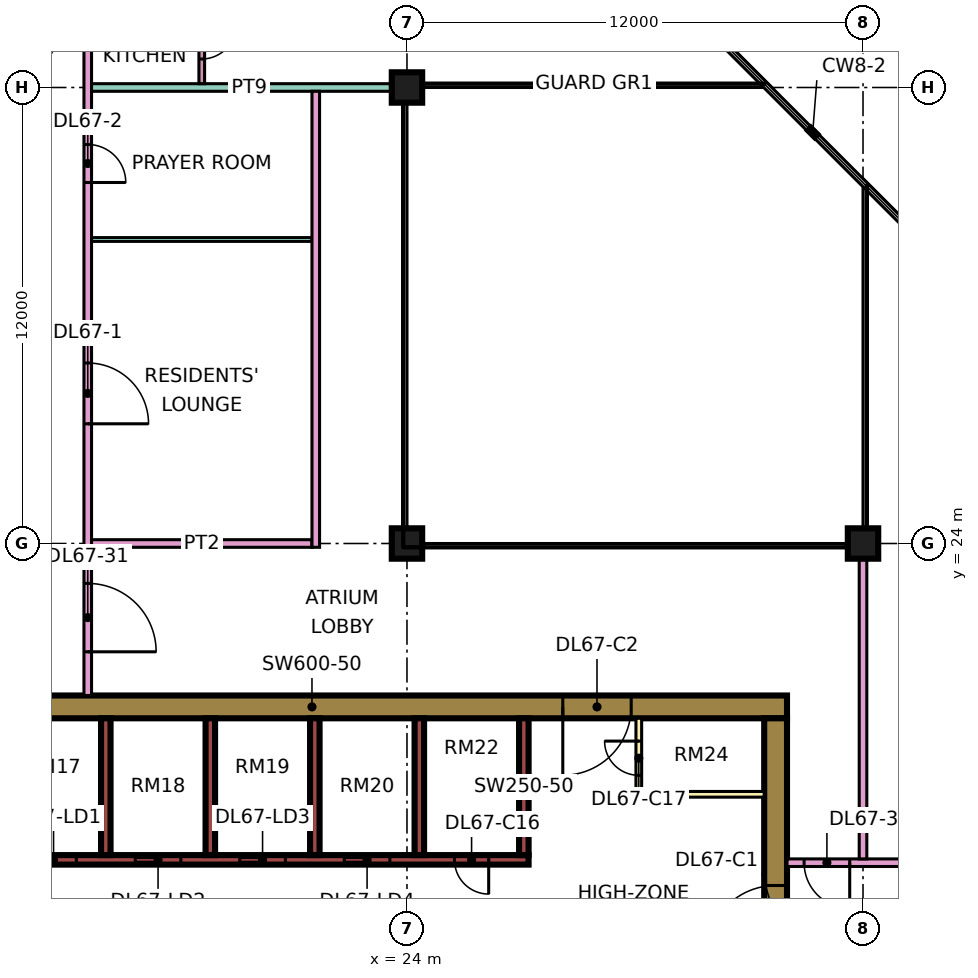
"""IFC4 building model, lengths in metres.
Left out: names, types, materials, properties, quantities, classifications, styles, units other than length and angle.
Written with IfcOpenShell. Run it as: python <this file> out.ifc"""

import sys

from ifc_helpers import new_model, si_unit, direction, frame, frame_2d, origin, origin_2d, place, context, subcontext, project, spatial, rectangle, extrude, element, fill, save


model = new_model("IFC4")
c1 = context("Model", 3, precision=1e-05, world=origin(), true_north=direction((0.0, 1.0)))
c2 = subcontext(c1, "Body", "Model", "MODEL_VIEW")
j1 = project(units=[si_unit("LENGTHUNIT", "METRE"), si_unit("PLANEANGLEUNIT", "RADIAN")], contexts=[c1])
p1 = place(None, origin())
s1 = spatial("IfcSite", under=j1, at=p1, CompositionType="ELEMENT")
p2 = place(p1, origin())
s2 = spatial("IfcBuilding", under=s1, at=p2, CompositionType="ELEMENT")
p3 = place(p2, frame((0.0, 0.0, 288.4)))
s3 = spatial("IfcBuildingStorey", under=s2, at=p3, CompositionType="ELEMENT", Elevation=288.4)
for number, where, z_axis, x_axis in (
    (1, (24.0, 24.0, 0.0), (0.0, 0.0, 1.0), (1.0, 0.0, 0.0)),
    (2, (24.0, 36.0, 0.0), (0.0, 0.0, 1.0), (1.0, 0.0, 0.0)),
    (3, (36.0, 24.0, 0.0), (0.0, 0.0, 1.0), (1.0, 0.0, 0.0)),
):
    element("IfcColumn", number, at=place(p3, frame(where, z_axis=z_axis, x_axis=x_axis)), inside=s3, PredefinedType="COLUMN", context=c2, shape_type="SweptSolid", body=[
        extrude(rectangle(XDim=0.8, YDim=0.8, at=origin_2d()), origin(), (0.0, 0.0, 1.0), 3.75),
    ])
p4 = place(p3, frame((9.0, 19.7, 0.0), z_axis=(0.0, 0.0, 1.0), x_axis=(1.0, 0.0, 0.0)))
e4 = element("IfcWall", 4, at=p4, inside=s3, PredefinedType="SHEAR", context=c2, shape_type="SweptSolid", body=[
    extrude(rectangle(XDim=25.0, YDim=0.6, at=frame_2d((12.5, 0.0))), origin(), (0.0, 0.0, 1.0), 3.75),
])
p5 = place(p4, frame((19.1, 0.0, 0.0)))
e5 = element("IfcOpeningElement", 5, at=p5, cuts=e4, PredefinedType="OPENING", context=c2, shape_type="SweptSolid", body=[
    extrude(rectangle(XDim=1.8, YDim=2.4, at=frame_2d((0.9, 1.2))), frame((0.0, 0.31, 0.0), z_axis=(0.0, -1.0, 0.0), x_axis=(1.0, 0.0, 0.0)), (0.0, 0.0, 1.0), 0.62),
])
p6 = place(p3, frame((33.7, 7.6, 0.0), z_axis=(0.0, 0.0, 1.0), x_axis=(0.0, 1.0, 0.0)))
e6 = element("IfcWall", 6, at=p6, inside=s3, PredefinedType="SHEAR", context=c2, shape_type="SweptSolid", body=[
    extrude(rectangle(XDim=11.8, YDim=0.6, at=frame_2d((5.9, 0.0))), origin(), (0.0, 0.0, 1.0), 3.75),
])
p7 = place(p6, frame((5.6, 0.0, 0.0)))
e7 = element("IfcOpeningElement", 7, at=p7, cuts=e6, PredefinedType="OPENING", context=c2, shape_type="SweptSolid", body=[
    extrude(rectangle(XDim=1.8, YDim=2.4, at=frame_2d((0.9, 1.2))), frame((0.0, 0.31, 0.0), z_axis=(0.0, -1.0, 0.0), x_axis=(1.0, 0.0, 0.0)), (0.0, 0.0, 1.0), 0.62),
])
p8 = place(p3, frame((13.45, 15.675, 0.0), z_axis=(0.0, 0.0, 1.0), x_axis=(1.0, 0.0, 0.0)))
e8 = element("IfcWall", 8, at=p8, inside=s3, PredefinedType="SHEAR", context=c2, shape_type="SweptSolid", body=[
    extrude(rectangle(XDim=13.75, YDim=0.25, at=frame_2d((6.875, 0.0))), origin(), (0.0, 0.0, 1.0), 3.75),
])
p9 = place(p8, frame((0.65, 0.0, 0.0)))
e9 = element("IfcOpeningElement", 9, at=p9, cuts=e8, PredefinedType="OPENING", context=c2, shape_type="SweptSolid", body=[
    extrude(rectangle(XDim=1.2, YDim=2.2, at=frame_2d((0.6, 1.1))), frame((0.0, 0.135, 0.0), z_axis=(0.0, -1.0, 0.0), x_axis=(1.0, 0.0, 0.0)), (0.0, 0.0, 1.0), 0.27),
])
p10 = place(p8, frame((3.4, 0.0, 0.0)))
e10 = element("IfcOpeningElement", 10, at=p10, cuts=e8, PredefinedType="OPENING", context=c2, shape_type="SweptSolid", body=[
    extrude(rectangle(XDim=1.2, YDim=2.2, at=frame_2d((0.6, 1.1))), frame((0.0, 0.135, 0.0), z_axis=(0.0, -1.0, 0.0), x_axis=(1.0, 0.0, 0.0)), (0.0, 0.0, 1.0), 0.27),
])
p11 = place(p8, frame((6.15, 0.0, 0.0)))
e11 = element("IfcOpeningElement", 11, at=p11, cuts=e8, PredefinedType="OPENING", context=c2, shape_type="SweptSolid", body=[
    extrude(rectangle(XDim=1.2, YDim=2.2, at=frame_2d((0.6, 1.1))), frame((0.0, 0.135, 0.0), z_axis=(0.0, -1.0, 0.0), x_axis=(1.0, 0.0, 0.0)), (0.0, 0.0, 1.0), 0.27),
])
p12 = place(p8, frame((8.9, 0.0, 0.0)))
e12 = element("IfcOpeningElement", 12, at=p12, cuts=e8, PredefinedType="OPENING", context=c2, shape_type="SweptSolid", body=[
    extrude(rectangle(XDim=1.2, YDim=2.2, at=frame_2d((0.6, 1.1))), frame((0.0, 0.135, 0.0), z_axis=(0.0, -1.0, 0.0), x_axis=(1.0, 0.0, 0.0)), (0.0, 0.0, 1.0), 0.27),
])
p13 = place(p8, frame((11.8, 0.0, 0.0)))
e13 = element("IfcOpeningElement", 13, at=p13, cuts=e8, PredefinedType="OPENING", context=c2, shape_type="SweptSolid", body=[
    extrude(rectangle(XDim=0.9, YDim=2.1, at=frame_2d((0.45, 1.05))), frame((0.0, 0.135, 0.0), z_axis=(0.0, -1.0, 0.0), x_axis=(1.0, 0.0, 0.0)), (0.0, 0.0, 1.0), 0.27),
])
for number, where, z_axis, x_axis in (
    (14, (16.075, 15.8, 0.0), (0.0, 0.0, 1.0), (0.0, 1.0, 0.0)),
    (15, (18.825, 15.8, 0.0), (0.0, 0.0, 1.0), (0.0, 1.0, 0.0)),
    (16, (21.575, 15.8, 0.0), (0.0, 0.0, 1.0), (0.0, 1.0, 0.0)),
    (17, (24.325, 15.8, 0.0), (0.0, 0.0, 1.0), (0.0, 1.0, 0.0)),
    (18, (27.075, 15.8, 0.0), (0.0, 0.0, 1.0), (0.0, 1.0, 0.0)),
):
    element("IfcWall", number, at=place(p3, frame(where, z_axis=z_axis, x_axis=x_axis)), inside=s3, PredefinedType="SHEAR", context=c2, shape_type="SweptSolid", body=[
        extrude(rectangle(XDim=3.6, YDim=0.25, at=frame_2d((1.8, 0.0))), origin(), (0.0, 0.0, 1.0), 3.75),
    ])
p14 = place(p3, frame((30.1, 17.4, 0.0), z_axis=(0.0, 0.0, 1.0), x_axis=(0.0, 1.0, 0.0)))
e19 = element("IfcWall", 19, at=p14, inside=s3, PredefinedType="PARTITIONING", context=c2, shape_type="SweptSolid", body=[
    extrude(rectangle(XDim=2.0, YDim=0.15, at=frame_2d((1.0, 0.0))), origin(), (0.0, 0.0, 1.0), 3.35),
])
p15 = place(p14, frame((0.5, 0.0, 0.0)))
e20 = element("IfcOpeningElement", 20, at=p15, cuts=e19, PredefinedType="OPENING", context=c2, shape_type="SweptSolid", body=[
    extrude(rectangle(XDim=0.9, YDim=2.1, at=frame_2d((0.45, 1.05))), frame((0.0, 0.085, 0.0), z_axis=(0.0, -1.0, 0.0), x_axis=(1.0, 0.0, 0.0)), (0.0, 0.0, 1.0), 0.17),
])
p16 = place(p3, frame((30.1, 17.4, 0.0), z_axis=(0.0, 0.0, 1.0), x_axis=(1.0, 0.0, 0.0)))
e21 = element("IfcWall", 21, at=p16, inside=s3, PredefinedType="PARTITIONING", context=c2, shape_type="SweptSolid", body=[
    extrude(rectangle(XDim=3.3, YDim=0.15, at=frame_2d((1.65, 0.0))), origin(), (0.0, 0.0, 1.0), 3.35),
])
p17 = place(p3, frame((15.6, 20.0, 0.0), z_axis=(0.0, 0.0, 1.0), x_axis=(0.0, 1.0, 0.0)))
e22 = element("IfcWall", 22, at=p17, inside=s3, PredefinedType="PARTITIONING", context=c2, shape_type="SweptSolid", body=[
    extrude(rectangle(XDim=27.775, YDim=0.2, at=frame_2d((13.887, 0.0))), origin(), (0.0, 0.0, 1.0), 3.35),
])
p18 = place(p17, frame((7.15, 0.0, 0.0)))
e23 = element("IfcOpeningElement", 23, at=p18, cuts=e22, PredefinedType="OPENING", context=c2, shape_type="SweptSolid", body=[
    extrude(rectangle(XDim=1.6, YDim=2.1, at=frame_2d((0.8, 1.05))), frame((0.0, 0.11, 0.0), z_axis=(0.0, -1.0, 0.0), x_axis=(1.0, 0.0, 0.0)), (0.0, 0.0, 1.0), 0.22),
])
p19 = place(p17, frame((13.5, 0.0, 0.0)))
e24 = element("IfcOpeningElement", 24, at=p19, cuts=e22, PredefinedType="OPENING", context=c2, shape_type="SweptSolid", body=[
    extrude(rectangle(XDim=1.0, YDim=2.1, at=frame_2d((0.5, 1.05))), frame((0.0, 0.11, 0.0), z_axis=(0.0, -1.0, 0.0), x_axis=(1.0, 0.0, 0.0)), (0.0, 0.0, 1.0), 0.22),
])
p20 = place(p17, frame((22.75, 0.0, 0.0)))
e25 = element("IfcOpeningElement", 25, at=p20, cuts=e22, PredefinedType="OPENING", context=c2, shape_type="SweptSolid", body=[
    extrude(rectangle(XDim=1.0, YDim=2.1, at=frame_2d((0.5, 1.05))), frame((0.0, 0.11, 0.0), z_axis=(0.0, -1.0, 0.0), x_axis=(1.0, 0.0, 0.0)), (0.0, 0.0, 1.0), 0.22),
])
p21 = place(p17, frame((1.15, 0.0, 0.0)))
e26 = element("IfcOpeningElement", 26, at=p21, cuts=e22, PredefinedType="OPENING", context=c2, shape_type="SweptSolid", body=[
    extrude(rectangle(XDim=1.8, YDim=2.1, at=frame_2d((0.9, 1.05))), frame((0.0, 0.11, 0.0), z_axis=(0.0, -1.0, 0.0), x_axis=(1.0, 0.0, 0.0)), (0.0, 0.0, 1.0), 0.22),
])
p22 = place(p17, frame((25.9, 0.0, 0.0)))
e27 = element("IfcOpeningElement", 27, at=p22, cuts=e22, PredefinedType="OPENING", context=c2, shape_type="SweptSolid", body=[
    extrude(rectangle(XDim=1.0, YDim=2.1, at=frame_2d((0.5, 1.05))), frame((0.0, 0.11, 0.0), z_axis=(0.0, -1.0, 0.0), x_axis=(1.0, 0.0, 0.0)), (0.0, 0.0, 1.0), 0.22),
])
p23 = place(p3, frame((15.7, 24.0, 0.0), z_axis=(0.0, 0.0, 1.0), x_axis=(1.0, 0.0, 0.0)))
e28 = element("IfcWall", 28, at=p23, inside=s3, PredefinedType="PARTITIONING", context=c2, shape_type="SweptSolid", body=[
    extrude(rectangle(XDim=5.8, YDim=0.2, at=frame_2d((2.9, 0.0))), origin(), (0.0, 0.0, 1.0), 3.35),
])
p24 = place(p3, frame((15.7, 32.0, 0.0), z_axis=(0.0, 0.0, 1.0), x_axis=(1.0, 0.0, 0.0)))
e29 = element("IfcWall", 29, at=p24, inside=s3, PredefinedType="PARTITIONING", context=c2, shape_type="SweptSolid", body=[
    extrude(rectangle(XDim=5.8, YDim=0.1, at=frame_2d((2.9, 0.0))), origin(), (0.0, 0.0, 1.0), 3.35),
])
p25 = place(p3, frame((15.7, 36.0, 0.0), z_axis=(0.0, 0.0, 1.0), x_axis=(1.0, 0.0, 0.0)))
e30 = element("IfcWall", 30, at=p25, inside=s3, PredefinedType="PARTITIONING", context=c2, shape_type="SweptSolid", body=[
    extrude(rectangle(XDim=8.3, YDim=0.2, at=frame_2d((4.15, 0.0))), origin(), (0.0, 0.0, 1.0), 3.35),
])
p26 = place(p3, frame((18.6, 36.1, 0.0), z_axis=(0.0, 0.0, 1.0), x_axis=(0.0, 1.0, 0.0)))
e31 = element("IfcWall", 31, at=p26, inside=s3, PredefinedType="PARTITIONING", context=c2, shape_type="SweptSolid", body=[
    extrude(rectangle(XDim=5.375, YDim=0.15, at=frame_2d((2.688, 0.0))), origin(), (0.0, 0.0, 1.0), 3.35),
])
p27 = place(p26, frame((3.45, 0.0, 0.0)))
e32 = element("IfcOpeningElement", 32, at=p27, cuts=e31, PredefinedType="OPENING", context=c2, shape_type="SweptSolid", body=[
    extrude(rectangle(XDim=0.8, YDim=2.1, at=frame_2d((0.4, 1.05))), frame((0.0, 0.085, 0.0), z_axis=(0.0, -1.0, 0.0), x_axis=(1.0, 0.0, 0.0)), (0.0, 0.0, 1.0), 0.17),
])
p28 = place(p26, frame((0.65, 0.0, 0.0)))
e33 = element("IfcOpeningElement", 33, at=p28, cuts=e31, PredefinedType="OPENING", context=c2, shape_type="SweptSolid", body=[
    extrude(rectangle(XDim=0.9, YDim=2.1, at=frame_2d((0.45, 1.05))), frame((0.0, 0.085, 0.0), z_axis=(0.0, -1.0, 0.0), x_axis=(1.0, 0.0, 0.0)), (0.0, 0.0, 1.0), 0.17),
])
p29 = place(p3, frame((21.6, 23.9, 0.0), z_axis=(0.0, 0.0, 1.0), x_axis=(0.0, 1.0, 0.0)))
e34 = element("IfcWall", 34, at=p29, inside=s3, PredefinedType="PARTITIONING", context=c2, shape_type="SweptSolid", body=[
    extrude(rectangle(XDim=12.0, YDim=0.2, at=frame_2d((6.0, 0.0))), origin(), (0.0, 0.0, 1.0), 3.35),
])
p30 = place(p3, frame((34.0, 15.6, 0.0), z_axis=(0.0, 0.0, 1.0), x_axis=(1.0, 0.0, 0.0)))
e35 = element("IfcWall", 35, at=p30, inside=s3, PredefinedType="PARTITIONING", context=c2, shape_type="SweptSolid", body=[
    extrude(rectangle(XDim=10.35, YDim=0.2, at=frame_2d((5.175, 0.0))), origin(), (0.0, 0.0, 1.0), 3.35),
])
p31 = place(p30, frame((5.6, 0.0, 0.0)))
e36 = element("IfcOpeningElement", 36, at=p31, cuts=e35, PredefinedType="OPENING", context=c2, shape_type="SweptSolid", body=[
    extrude(rectangle(XDim=1.0, YDim=2.1, at=frame_2d((0.5, 1.05))), frame((0.0, 0.11, 0.0), z_axis=(0.0, -1.0, 0.0), x_axis=(1.0, 0.0, 0.0)), (0.0, 0.0, 1.0), 0.22),
])
p32 = place(p30, frame((0.45, 0.0, 0.0)))
e37 = element("IfcOpeningElement", 37, at=p32, cuts=e35, PredefinedType="OPENING", context=c2, shape_type="SweptSolid", body=[
    extrude(rectangle(XDim=1.2, YDim=2.1, at=frame_2d((0.6, 1.05))), frame((0.0, 0.11, 0.0), z_axis=(0.0, -1.0, 0.0), x_axis=(1.0, 0.0, 0.0)), (0.0, 0.0, 1.0), 0.22),
])
p33 = place(p3, frame((36.0, 15.7, 0.0), z_axis=(0.0, 0.0, 1.0), x_axis=(0.0, 1.0, 0.0)))
e38 = element("IfcWall", 38, at=p33, inside=s3, PredefinedType="PARTITIONING", context=c2, shape_type="SweptSolid", body=[
    extrude(rectangle(XDim=8.3, YDim=0.2, at=frame_2d((4.15, 0.0))), origin(), (0.0, 0.0, 1.0), 3.35),
])
p34 = place(p9, origin())
e39 = element("IfcDoor", 39, at=p34, inside=s3, OperationType="DOUBLE_DOOR_SLIDING", PredefinedType="DOOR", context=c2, shape_type="SweptSolid", body=[
    extrude(rectangle(XDim=1.2, YDim=2.2, at=frame_2d((0.6, 1.1))), frame((0.0, 0.025, 0.0), z_axis=(0.0, -1.0, 0.0), x_axis=(1.0, 0.0, 0.0)), (0.0, 0.0, 1.0), 0.05),
])
fill(e9, e39)
p35 = place(p10, origin())
e40 = element("IfcDoor", 40, at=p35, inside=s3, OperationType="DOUBLE_DOOR_SLIDING", PredefinedType="DOOR", context=c2, shape_type="SweptSolid", body=[
    extrude(rectangle(XDim=1.2, YDim=2.2, at=frame_2d((0.6, 1.1))), frame((0.0, 0.025, 0.0), z_axis=(0.0, -1.0, 0.0), x_axis=(1.0, 0.0, 0.0)), (0.0, 0.0, 1.0), 0.05),
])
fill(e10, e40)
p36 = place(p11, origin())
e41 = element("IfcDoor", 41, at=p36, inside=s3, OperationType="DOUBLE_DOOR_SLIDING", PredefinedType="DOOR", context=c2, shape_type="SweptSolid", body=[
    extrude(rectangle(XDim=1.2, YDim=2.2, at=frame_2d((0.6, 1.1))), frame((0.0, 0.025, 0.0), z_axis=(0.0, -1.0, 0.0), x_axis=(1.0, 0.0, 0.0)), (0.0, 0.0, 1.0), 0.05),
])
fill(e11, e41)
p37 = place(p12, origin())
e42 = element("IfcDoor", 42, at=p37, inside=s3, OperationType="DOUBLE_DOOR_SLIDING", PredefinedType="DOOR", context=c2, shape_type="SweptSolid", body=[
    extrude(rectangle(XDim=1.2, YDim=2.2, at=frame_2d((0.6, 1.1))), frame((0.0, 0.025, 0.0), z_axis=(0.0, -1.0, 0.0), x_axis=(1.0, 0.0, 0.0)), (0.0, 0.0, 1.0), 0.05),
])
fill(e12, e42)
p38 = place(p7, origin())
e43 = element("IfcDoor", 43, at=p38, inside=s3, OperationType="DOUBLE_DOOR_SINGLE_SWING", PredefinedType="DOOR", context=c2, shape_type="SweptSolid", body=[
    extrude(rectangle(XDim=1.8, YDim=2.4, at=frame_2d((0.9, 1.2))), frame((0.0, 0.025, 0.0), z_axis=(0.0, -1.0, 0.0), x_axis=(1.0, 0.0, 0.0)), (0.0, 0.0, 1.0), 0.05),
])
fill(e7, e43)
p39 = place(p5, frame((1.8, 0.0, 0.0), z_axis=(0.0, 0.0, 1.0), x_axis=(-1.0, 0.0, 0.0)))
e44 = element("IfcDoor", 44, at=p39, inside=s3, OperationType="DOUBLE_DOOR_SINGLE_SWING", PredefinedType="DOOR", context=c2, shape_type="SweptSolid", body=[
    extrude(rectangle(XDim=1.8, YDim=2.4, at=frame_2d((0.9, 1.2))), frame((0.0, 0.025, 0.0), z_axis=(0.0, -1.0, 0.0), x_axis=(1.0, 0.0, 0.0)), (0.0, 0.0, 1.0), 0.05),
])
fill(e5, e44)
p40 = place(p13, origin())
e45 = element("IfcDoor", 45, at=p40, inside=s3, OperationType="SINGLE_SWING_RIGHT", PredefinedType="DOOR", context=c2, shape_type="SweptSolid", body=[
    extrude(rectangle(XDim=0.9, YDim=2.1, at=frame_2d((0.45, 1.05))), frame((0.0, 0.025, 0.0), z_axis=(0.0, -1.0, 0.0), x_axis=(1.0, 0.0, 0.0)), (0.0, 0.0, 1.0), 0.05),
])
fill(e13, e45)
p41 = place(p15, frame((0.9, 0.0, 0.0), z_axis=(0.0, 0.0, 1.0), x_axis=(-1.0, 0.0, 0.0)))
e46 = element("IfcDoor", 46, at=p41, inside=s3, OperationType="SINGLE_SWING_RIGHT", PredefinedType="DOOR", context=c2, shape_type="SweptSolid", body=[
    extrude(rectangle(XDim=0.9, YDim=2.1, at=frame_2d((0.45, 1.05))), frame((0.0, 0.025, 0.0), z_axis=(0.0, -1.0, 0.0), x_axis=(1.0, 0.0, 0.0)), (0.0, 0.0, 1.0), 0.05),
])
fill(e20, e46)
p42 = place(p18, frame((1.6, 0.0, 0.0), z_axis=(0.0, 0.0, 1.0), x_axis=(-1.0, 0.0, 0.0)))
e47 = element("IfcDoor", 47, at=p42, inside=s3, OperationType="DOUBLE_DOOR_SINGLE_SWING", PredefinedType="DOOR", context=c2, shape_type="SweptSolid", body=[
    extrude(rectangle(XDim=1.6, YDim=2.1, at=frame_2d((0.8, 1.05))), frame((0.0, 0.025, 0.0), z_axis=(0.0, -1.0, 0.0), x_axis=(1.0, 0.0, 0.0)), (0.0, 0.0, 1.0), 0.05),
])
fill(e23, e47)
p43 = place(p19, frame((1.0, 0.0, 0.0), z_axis=(0.0, 0.0, 1.0), x_axis=(-1.0, 0.0, 0.0)))
e48 = element("IfcDoor", 48, at=p43, inside=s3, OperationType="SINGLE_SWING_LEFT", PredefinedType="DOOR", context=c2, shape_type="SweptSolid", body=[
    extrude(rectangle(XDim=1.0, YDim=2.1, at=frame_2d((0.5, 1.05))), frame((0.0, 0.025, 0.0), z_axis=(0.0, -1.0, 0.0), x_axis=(1.0, 0.0, 0.0)), (0.0, 0.0, 1.0), 0.05),
])
fill(e24, e48)
p44 = place(p28, origin())
e49 = element("IfcDoor", 49, at=p44, inside=s3, OperationType="SINGLE_SWING_RIGHT", PredefinedType="DOOR", context=c2, shape_type="SweptSolid", body=[
    extrude(rectangle(XDim=0.9, YDim=2.1, at=frame_2d((0.45, 1.05))), frame((0.0, 0.025, 0.0), z_axis=(0.0, -1.0, 0.0), x_axis=(1.0, 0.0, 0.0)), (0.0, 0.0, 1.0), 0.05),
])
fill(e33, e49)
p45 = place(p32, origin())
e50 = element("IfcDoor", 50, at=p45, inside=s3, OperationType="SINGLE_SWING_RIGHT", PredefinedType="DOOR", context=c2, shape_type="SweptSolid", body=[
    extrude(rectangle(XDim=1.2, YDim=2.1, at=frame_2d((0.6, 1.05))), frame((0.0, 0.025, 0.0), z_axis=(0.0, -1.0, 0.0), x_axis=(1.0, 0.0, 0.0)), (0.0, 0.0, 1.0), 0.05),
])
fill(e37, e50)
p46 = place(p21, frame((1.8, 0.0, 0.0), z_axis=(0.0, 0.0, 1.0), x_axis=(-1.0, 0.0, 0.0)))
e51 = element("IfcDoor", 51, at=p46, inside=s3, OperationType="DOUBLE_DOOR_SINGLE_SWING", PredefinedType="DOOR", context=c2, shape_type="SweptSolid", body=[
    extrude(rectangle(XDim=1.8, YDim=2.1, at=frame_2d((0.9, 1.05))), frame((0.0, 0.025, 0.0), z_axis=(0.0, -1.0, 0.0), x_axis=(1.0, 0.0, 0.0)), (0.0, 0.0, 1.0), 0.05),
])
fill(e26, e51)
save(model, sys.argv[1])
